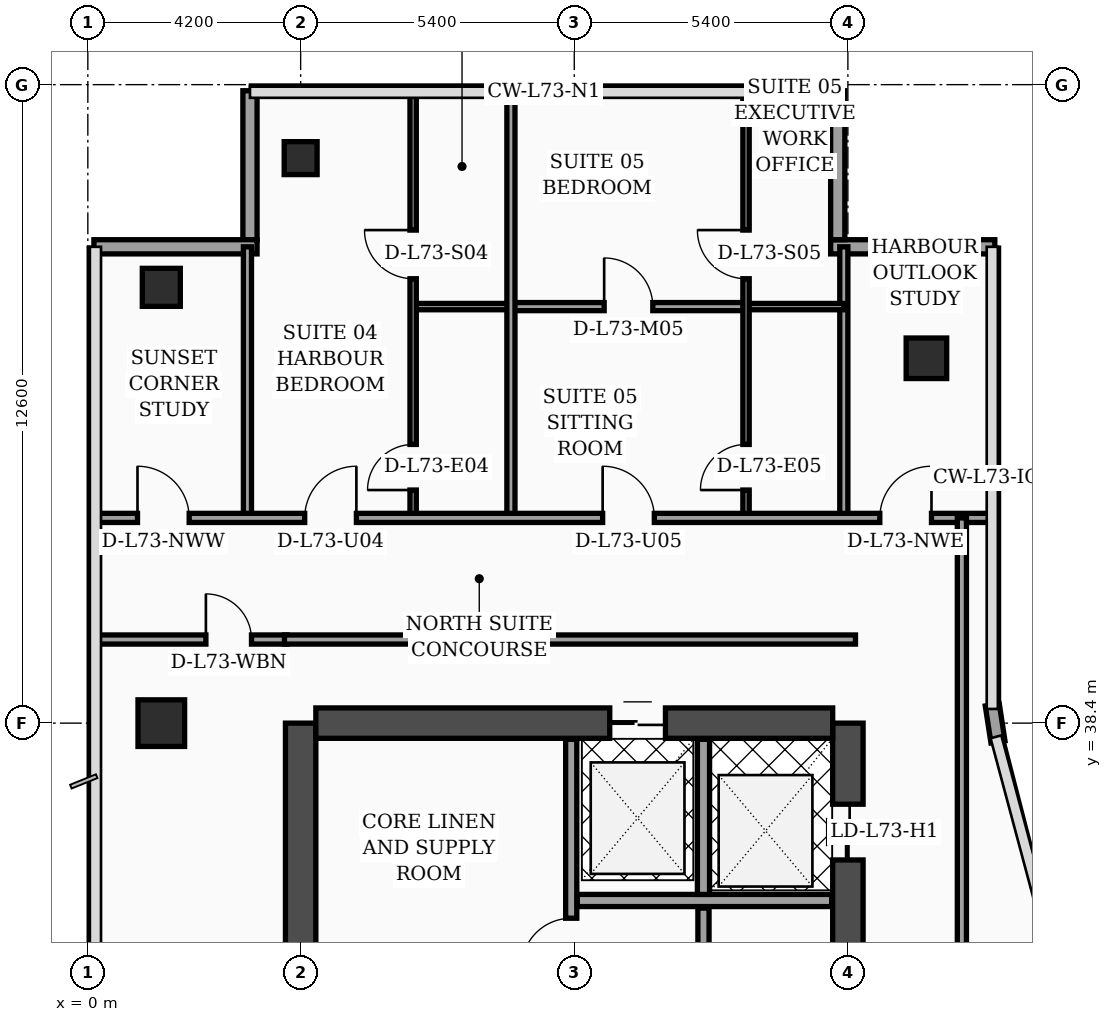
"""IFC4 building model, lengths in metres.
Left out: names, types, materials, properties, quantities, classifications, styles, units other than length and angle.
Written with IfcOpenShell. Run it as: python <this file> out.ifc"""

import sys

from ifc_helpers import new_model, si_unit, direction, frame, frame_2d, origin, origin_2d, place, context, subcontext, project, spatial, rectangle, hollow_rectangle, extrude, element, fill, save


model = new_model("IFC4")
c1 = context("Model", 3, precision=1e-05, world=origin(), true_north=direction((0.0, 1.0)))
c2 = subcontext(c1, "Body", "Model", "MODEL_VIEW")
j1 = project(units=[si_unit("LENGTHUNIT", "METRE"), si_unit("PLANEANGLEUNIT", "RADIAN")], contexts=[c1])
p1 = place(None, origin())
s1 = spatial("IfcSite", under=j1, at=p1, CompositionType="ELEMENT")
p2 = place(p1, origin())
s2 = spatial("IfcBuilding", under=s1, at=p2, CompositionType="ELEMENT")
p3 = place(p2, frame((0.0, 0.0, 294.9)))
s3 = spatial("IfcBuildingStorey", under=s2, at=p3, CompositionType="ELEMENT", Elevation=294.9)
p4 = place(p3, frame((4.2, 16.8, 0.0), z_axis=(0.0, 0.0, 1.0), x_axis=(0.0, 1.0, 0.0)))
e1 = element("IfcWall", 1, at=p4, inside=s3, PredefinedType="SHEAR", context=c2, shape_type="SweptSolid", body=[
    extrude(rectangle(XDim=21.6, YDim=0.6, at=frame_2d((10.8, 0.0))), origin(), (0.0, 0.0, 1.0), 3.56),
])
p5 = place(p3, frame((15.0, 16.8, 0.0), z_axis=(0.0, 0.0, 1.0), x_axis=(0.0, 1.0, 0.0)))
e2 = element("IfcWall", 2, at=p5, inside=s3, PredefinedType="SHEAR", context=c2, shape_type="SweptSolid", body=[
    extrude(rectangle(XDim=21.6, YDim=0.6, at=frame_2d((10.8, 0.0))), origin(), (0.0, 0.0, 1.0), 3.56),
])
p6 = place(p5, frame((8.65, 0.0, 0.0)))
e3 = element("IfcOpeningElement", 3, at=p6, cuts=e2, PredefinedType="OPENING", context=c2, shape_type="SweptSolid", body=[
    extrude(rectangle(XDim=1.1, YDim=2.2, at=frame_2d((0.55, 1.1))), frame((0.0, 0.31, 0.0), z_axis=(0.0, -1.0, 0.0), x_axis=(1.0, 0.0, 0.0)), (0.0, 0.0, 1.0), 0.62),
])
p7 = place(p5, frame((18.9, 0.0, 0.0)))
e4 = element("IfcOpeningElement", 4, at=p7, cuts=e2, PredefinedType="OPENING", context=c2, shape_type="SweptSolid", body=[
    extrude(rectangle(XDim=1.1, YDim=2.2, at=frame_2d((0.55, 1.1))), frame((0.0, 0.31, 0.0), z_axis=(0.0, -1.0, 0.0), x_axis=(1.0, 0.0, 0.0)), (0.0, 0.0, 1.0), 0.62),
])
p8 = place(p3, frame((4.5, 38.4, 0.0), z_axis=(0.0, 0.0, 1.0), x_axis=(1.0, 0.0, 0.0)))
e5 = element("IfcWall", 5, at=p8, inside=s3, PredefinedType="SHEAR", context=c2, shape_type="SweptSolid", body=[
    extrude(rectangle(XDim=10.2, YDim=0.6, at=frame_2d((5.1, 0.0))), origin(), (0.0, 0.0, 1.0), 3.56),
])
p9 = place(p8, frame((5.8, 0.0, 0.0)))
e6 = element("IfcOpeningElement", 6, at=p9, cuts=e5, PredefinedType="OPENING", context=c2, shape_type="SweptSolid", body=[
    extrude(rectangle(XDim=1.1, YDim=2.2, at=frame_2d((0.55, 1.1))), frame((0.0, 0.31, 0.0), z_axis=(0.0, -1.0, 0.0), x_axis=(1.0, 0.0, 0.0)), (0.0, 0.0, 1.0), 0.62),
])
p10 = place(p3, frame((1.45, 38.4, 0.0), z_axis=(0.0, 0.0, 1.0), x_axis=(1.0, 0.0, 0.0)))
e7 = element("IfcColumn", 7, at=p10, inside=s3, PredefinedType="COLUMN", context=c2, shape_type="SweptSolid", body=[
    extrude(rectangle(XDim=0.92, YDim=0.92, at=origin_2d()), origin(), (0.0, 0.0, 1.0), 3.56),
])
p11 = place(p3, frame((1.45, 47.0, 0.0), z_axis=(0.0, 0.0, 1.0), x_axis=(1.0, 0.0, 0.0)))
e8 = element("IfcColumn", 8, at=p11, inside=s3, PredefinedType="COLUMN", context=c2, shape_type="SweptSolid", body=[
    extrude(hollow_rectangle(XDim=0.75, YDim=0.75, WallThickness=0.032, at=origin_2d()), origin(), (0.0, 0.0, 1.0), 3.56),
])
p12 = place(p3, frame((4.2, 49.55, 0.0), z_axis=(0.0, 0.0, 1.0), x_axis=(1.0, 0.0, 0.0)))
e9 = element("IfcColumn", 9, at=p12, inside=s3, PredefinedType="COLUMN", context=c2, shape_type="SweptSolid", body=[
    extrude(hollow_rectangle(XDim=0.65, YDim=0.65, WallThickness=0.028, at=origin_2d()), origin(), (0.0, 0.0, 1.0), 3.56),
])
p13 = place(p3, frame((16.55, 45.6, 0.0), z_axis=(0.0, 0.0, 1.0), x_axis=(1.0, 0.0, 0.0)))
e10 = element("IfcColumn", 10, at=p13, inside=s3, PredefinedType="COLUMN", context=c2, shape_type="SweptSolid", body=[
    extrude(rectangle(XDim=0.8, YDim=0.8, at=origin_2d()), origin(), (0.0, 0.0, 1.0), 3.56),
])
p14 = place(p3, frame((17.962, 38.03, 0.0), z_axis=(0.0, 0.0, 1.0), x_axis=(-0.15141125477, 0.988470855377, 0.0)))
e11 = element("IfcWall", 11, at=p14, inside=s3, PredefinedType="SOLIDWALL", context=c2, shape_type="SweptSolid", body=[
    extrude(rectangle(XDim=0.739, YDim=0.28, at=frame_2d((0.369, 0.0))), origin(), (0.0, 0.0, 1.0), 3.56),
])
p15 = place(p3, frame((17.9, 47.8, 0.0), z_axis=(0.0, 0.0, 1.0), x_axis=(-1.0, 0.0, 0.0)))
e12 = element("IfcWall", 12, at=p15, inside=s3, PredefinedType="SOLIDWALL", context=c2, shape_type="SweptSolid", body=[
    extrude(rectangle(XDim=3.24, YDim=0.28, at=frame_2d((1.62, 0.0))), origin(), (0.0, 0.0, 1.0), 3.56),
])
p16 = place(p3, frame((14.8, 47.94, 0.0), z_axis=(0.0, 0.0, 1.0), x_axis=(0.0, 1.0, 0.0)))
e13 = element("IfcWall", 13, at=p16, inside=s3, PredefinedType="SOLIDWALL", context=c2, shape_type="SweptSolid", body=[
    extrude(rectangle(XDim=2.94, YDim=0.28, at=frame_2d((1.47, 0.0))), origin(), (0.0, 0.0, 1.0), 3.56),
])
p17 = place(p3, frame((3.2, 50.88, 0.0), z_axis=(0.0, 0.0, 1.0), x_axis=(0.0, -1.0, 0.0)))
e14 = element("IfcWall", 14, at=p17, inside=s3, PredefinedType="SOLIDWALL", context=c2, shape_type="SweptSolid", body=[
    extrude(rectangle(XDim=2.94, YDim=0.28, at=frame_2d((1.47, 0.0))), origin(), (0.0, 0.0, 1.0), 3.09),
])
p18 = place(p3, frame((3.34, 47.8, 0.0), z_axis=(0.0, 0.0, 1.0), x_axis=(-1.0, 0.0, 0.0)))
e15 = element("IfcWall", 15, at=p18, inside=s3, PredefinedType="SOLIDWALL", context=c2, shape_type="SweptSolid", body=[
    extrude(rectangle(XDim=3.22, YDim=0.28, at=frame_2d((1.61, 0.0))), origin(), (0.0, 0.0, 1.0), 3.09),
])
p19 = place(p3, frame((9.54, 32.92, 0.0), z_axis=(0.0, 0.0, 1.0), x_axis=(0.0, 1.0, 0.0)))
e16 = element("IfcWall", 16, at=p19, inside=s3, PredefinedType="SOLIDWALL", context=c2, shape_type="SweptSolid", body=[
    extrude(rectangle(XDim=5.16, YDim=0.22, at=frame_2d((2.58, 0.0))), origin(), (0.0, 0.0, 1.0), 3.56),
])
p20 = place(p19, frame((0.65, 0.0, 0.0)))
e17 = element("IfcOpeningElement", 17, at=p20, cuts=e16, PredefinedType="OPENING", context=c2, shape_type="SweptSolid", body=[
    extrude(rectangle(XDim=0.98, YDim=2.15, at=frame_2d((0.49, 1.075))), frame((0.0, 0.12, 0.0), z_axis=(0.0, -1.0, 0.0), x_axis=(1.0, 0.0, 0.0)), (0.0, 0.0, 1.0), 0.24),
])
p21 = place(p3, frame((12.15, 27.0, 0.0), z_axis=(0.0, 0.0, 1.0), x_axis=(0.0, 1.0, 0.0)))
e18 = element("IfcWall", 18, at=p21, inside=s3, PredefinedType="SOLIDWALL", context=c2, shape_type="SweptSolid", body=[
    extrude(rectangle(XDim=7.75, YDim=0.22, at=frame_2d((3.875, 0.0))), origin(), (0.0, 0.0, 1.0), 3.56),
])
p22 = place(p21, frame((0.8, 0.0, 0.0)))
e19 = element("IfcOpeningElement", 19, at=p22, cuts=e18, PredefinedType="OPENING", context=c2, shape_type="SweptSolid", body=[
    extrude(rectangle(XDim=0.98, YDim=2.15, at=frame_2d((0.49, 1.075))), frame((0.0, 0.12, 0.0), z_axis=(0.0, -1.0, 0.0), x_axis=(1.0, 0.0, 0.0)), (0.0, 0.0, 1.0), 0.24),
])
p23 = place(p3, frame((9.66, 34.9, 0.0), z_axis=(0.0, 0.0, 1.0), x_axis=(1.0, 0.0, 0.0)))
e20 = element("IfcWall", 20, at=p23, inside=s3, PredefinedType="SOLIDWALL", context=c2, shape_type="SweptSolid", body=[
    extrude(rectangle(XDim=5.02, YDim=0.24, at=frame_2d((2.51, 0.0))), origin(), (0.0, 0.0, 1.0), 3.56),
])
p24 = place(p3, frame((12.15, 35.02, 0.0), z_axis=(0.0, 0.0, 1.0), x_axis=(0.0, 1.0, 0.0)))
e21 = element("IfcWall", 21, at=p24, inside=s3, PredefinedType="SOLIDWALL", context=c2, shape_type="SweptSolid", body=[
    extrude(rectangle(XDim=3.06, YDim=0.24, at=frame_2d((1.53, 0.0))), origin(), (0.0, 0.0, 1.0), 3.56),
])
p25 = place(p3, frame((0.08, 40.05, 0.0), z_axis=(0.0, 0.0, 1.0), x_axis=(1.0, 0.0, 0.0)))
e22 = element("IfcWall", 22, at=p25, inside=s3, PredefinedType="PARTITIONING", context=c2, shape_type="SweptSolid", body=[
    extrude(rectangle(XDim=3.85, YDim=0.18, at=frame_2d((1.925, 0.0))), origin(), (0.0, 0.0, 1.0), 2.99),
])
p26 = place(p25, frame((2.25, 0.0, 0.0)))
e23 = element("IfcOpeningElement", 23, at=p26, cuts=e22, PredefinedType="OPENING", context=c2, shape_type="SweptSolid", body=[
    extrude(rectangle(XDim=0.9, YDim=2.15, at=frame_2d((0.45, 1.075))), frame((0.0, 0.1, 0.0), z_axis=(0.0, -1.0, 0.0), x_axis=(1.0, 0.0, 0.0)), (0.0, 0.0, 1.0), 0.2),
])
p27 = place(p3, frame((3.15, 42.45, 0.0), z_axis=(0.0, 0.0, 1.0), x_axis=(0.0, 1.0, 0.0)))
e24 = element("IfcWall", 24, at=p27, inside=s3, PredefinedType="PARTITIONING", context=c2, shape_type="SweptSolid", body=[
    extrude(rectangle(XDim=5.35, YDim=0.16, at=frame_2d((2.675, 0.0))), origin(), (0.0, 0.0, 1.0), 3.14),
])
p28 = place(p3, frame((14.92, 42.45, 0.0), z_axis=(0.0, 0.0, 1.0), x_axis=(0.0, 1.0, 0.0)))
e25 = element("IfcWall", 25, at=p28, inside=s3, PredefinedType="PARTITIONING", context=c2, shape_type="SweptSolid", body=[
    extrude(rectangle(XDim=5.35, YDim=0.16, at=frame_2d((2.675, 0.0))), origin(), (0.0, 0.0, 1.0), 3.09),
])
p29 = place(p3, frame((6.42, 46.62, 0.0), z_axis=(0.0, 0.0, 1.0), x_axis=(1.0, 0.0, 0.0)))
e26 = element("IfcWall", 26, at=p29, inside=s3, PredefinedType="PARTITIONING", context=c2, shape_type="SweptSolid", body=[
    extrude(rectangle(XDim=1.93, YDim=0.125, at=frame_2d((0.965, 0.0))), origin(), (0.0, 0.0, 1.0), 3.56),
])
p30 = place(p3, frame((6.42, 42.45, 0.0), z_axis=(0.0, 0.0, 1.0), x_axis=(0.0, 1.0, 0.0)))
e27 = element("IfcWall", 27, at=p30, inside=s3, PredefinedType="PARTITIONING", context=c2, shape_type="SweptSolid", body=[
    extrude(rectangle(XDim=8.49, YDim=0.125, at=frame_2d((4.245, 0.0))), origin(), (0.0, 0.0, 1.0), 3.09),
])
p31 = place(p30, frame((0.55, 0.0, 0.0)))
e28 = element("IfcOpeningElement", 28, at=p31, cuts=e27, PredefinedType="OPENING", context=c2, shape_type="SweptSolid", body=[
    extrude(rectangle(XDim=0.9, YDim=2.15, at=frame_2d((0.45, 1.075))), frame((0.0, 0.073, 0.0), z_axis=(0.0, -1.0, 0.0), x_axis=(1.0, 0.0, 0.0)), (0.0, 0.0, 1.0), 0.145),
])
p32 = place(p30, frame((4.72, 0.0, 0.0)))
e29 = element("IfcOpeningElement", 29, at=p32, cuts=e27, PredefinedType="OPENING", context=c2, shape_type="SweptSolid", body=[
    extrude(rectangle(XDim=0.96, YDim=2.2, at=frame_2d((0.48, 1.1))), frame((0.0, 0.073, 0.0), z_axis=(0.0, -1.0, 0.0), x_axis=(1.0, 0.0, 0.0)), (0.0, 0.0, 1.0), 0.145),
])
p33 = place(p3, frame((12.99, 46.62, 0.0), z_axis=(0.0, 0.0, 1.0), x_axis=(1.0, 0.0, 0.0)))
e30 = element("IfcWall", 30, at=p33, inside=s3, PredefinedType="PARTITIONING", context=c2, shape_type="SweptSolid", body=[
    extrude(rectangle(XDim=1.93, YDim=0.125, at=frame_2d((0.965, 0.0))), origin(), (0.0, 0.0, 1.0), 3.09),
])
p34 = place(p3, frame((8.35, 46.62, 0.0), z_axis=(0.0, 0.0, 1.0), x_axis=(1.0, 0.0, 0.0)))
e31 = element("IfcWall", 31, at=p34, inside=s3, PredefinedType="PARTITIONING", context=c2, shape_type="SweptSolid", body=[
    extrude(rectangle(XDim=4.64, YDim=0.16, at=frame_2d((2.32, 0.0))), origin(), (0.0, 0.0, 1.0), 3.09),
])
p35 = place(p34, frame((1.84, 0.0, 0.0)))
e32 = element("IfcOpeningElement", 32, at=p35, cuts=e31, PredefinedType="OPENING", context=c2, shape_type="SweptSolid", body=[
    extrude(rectangle(XDim=0.96, YDim=2.2, at=frame_2d((0.48, 1.1))), frame((0.0, 0.09, 0.0), z_axis=(0.0, -1.0, 0.0), x_axis=(1.0, 0.0, 0.0)), (0.0, 0.0, 1.0), 0.18),
])
p36 = place(p3, frame((12.99, 42.45, 0.0), z_axis=(0.0, 0.0, 1.0), x_axis=(0.0, 1.0, 0.0)))
e33 = element("IfcWall", 33, at=p36, inside=s3, PredefinedType="PARTITIONING", context=c2, shape_type="SweptSolid", body=[
    extrude(rectangle(XDim=8.49, YDim=0.125, at=frame_2d((4.245, 0.0))), origin(), (0.0, 0.0, 1.0), 3.09),
])
p37 = place(p36, frame((0.55, 0.0, 0.0)))
e34 = element("IfcOpeningElement", 34, at=p37, cuts=e33, PredefinedType="OPENING", context=c2, shape_type="SweptSolid", body=[
    extrude(rectangle(XDim=0.9, YDim=2.15, at=frame_2d((0.45, 1.075))), frame((0.0, 0.073, 0.0), z_axis=(0.0, -1.0, 0.0), x_axis=(1.0, 0.0, 0.0)), (0.0, 0.0, 1.0), 0.145),
])
p38 = place(p36, frame((4.72, 0.0, 0.0)))
e35 = element("IfcOpeningElement", 35, at=p38, cuts=e33, PredefinedType="OPENING", context=c2, shape_type="SweptSolid", body=[
    extrude(rectangle(XDim=0.96, YDim=2.2, at=frame_2d((0.48, 1.1))), frame((0.0, 0.073, 0.0), z_axis=(0.0, -1.0, 0.0), x_axis=(1.0, 0.0, 0.0)), (0.0, 0.0, 1.0), 0.145),
])
p39 = place(p3, frame((8.35, 42.45, 0.0), z_axis=(0.0, 0.0, 1.0), x_axis=(0.0, 1.0, 0.0)))
e36 = element("IfcWall", 36, at=p39, inside=s3, PredefinedType="PARTITIONING", context=c2, shape_type="SweptSolid", body=[
    extrude(rectangle(XDim=8.49, YDim=0.16, at=frame_2d((4.245, 0.0))), origin(), (0.0, 0.0, 1.0), 3.09),
])
p40 = place(p3, frame((0.08, 42.45, 0.0), z_axis=(0.0, 0.0, 1.0), x_axis=(1.0, 0.0, 0.0)))
e37 = element("IfcWall", 37, at=p40, inside=s3, PredefinedType="PARTITIONING", context=c2, shape_type="SweptSolid", body=[
    extrude(rectangle(XDim=17.77, YDim=0.18, at=frame_2d((8.885, 0.0))), origin(), (0.0, 0.0, 1.0), 2.99),
])
p41 = place(p40, frame((0.9, 0.0, 0.0)))
e38 = element("IfcOpeningElement", 38, at=p41, cuts=e37, PredefinedType="OPENING", context=c2, shape_type="SweptSolid", body=[
    extrude(rectangle(XDim=1.02, YDim=2.2, at=frame_2d((0.51, 1.1))), frame((0.0, 0.1, 0.0), z_axis=(0.0, -1.0, 0.0), x_axis=(1.0, 0.0, 0.0)), (0.0, 0.0, 1.0), 0.2),
])
p42 = place(p40, frame((4.2, 0.0, 0.0)))
e39 = element("IfcOpeningElement", 39, at=p42, cuts=e37, PredefinedType="OPENING", context=c2, shape_type="SweptSolid", body=[
    extrude(rectangle(XDim=1.02, YDim=2.2, at=frame_2d((0.51, 1.1))), frame((0.0, 0.1, 0.0), z_axis=(0.0, -1.0, 0.0), x_axis=(1.0, 0.0, 0.0)), (0.0, 0.0, 1.0), 0.2),
])
p43 = place(p40, frame((10.08, 0.0, 0.0)))
e40 = element("IfcOpeningElement", 40, at=p43, cuts=e37, PredefinedType="OPENING", context=c2, shape_type="SweptSolid", body=[
    extrude(rectangle(XDim=1.02, YDim=2.2, at=frame_2d((0.51, 1.1))), frame((0.0, 0.1, 0.0), z_axis=(0.0, -1.0, 0.0), x_axis=(1.0, 0.0, 0.0)), (0.0, 0.0, 1.0), 0.2),
])
p44 = place(p40, frame((15.55, 0.0, 0.0)))
e41 = element("IfcOpeningElement", 41, at=p44, cuts=e37, PredefinedType="OPENING", context=c2, shape_type="SweptSolid", body=[
    extrude(rectangle(XDim=1.02, YDim=2.2, at=frame_2d((0.51, 1.1))), frame((0.0, 0.1, 0.0), z_axis=(0.0, -1.0, 0.0), x_axis=(1.0, 0.0, 0.0)), (0.0, 0.0, 1.0), 0.2),
])
p45 = place(p3, frame((17.25, 24.3, 0.0), z_axis=(0.0, 0.0, 1.0), x_axis=(0.0, 1.0, 0.0)))
e42 = element("IfcWall", 42, at=p45, inside=s3, PredefinedType="PARTITIONING", context=c2, shape_type="SweptSolid", body=[
    extrude(rectangle(XDim=18.15, YDim=0.18, at=frame_2d((9.075, 0.0))), origin(), (0.0, 0.0, 1.0), 2.99),
])
p46 = place(p45, frame((3.2, 0.0, 0.0)))
e43 = element("IfcOpeningElement", 43, at=p46, cuts=e42, PredefinedType="OPENING", context=c2, shape_type="SweptSolid", body=[
    extrude(rectangle(XDim=1.02, YDim=2.2, at=frame_2d((0.51, 1.1))), frame((0.0, 0.1, 0.0), z_axis=(0.0, -1.0, 0.0), x_axis=(1.0, 0.0, 0.0)), (0.0, 0.0, 1.0), 0.2),
])
p47 = place(p3, frame((3.88, 40.05, 0.0), z_axis=(0.0, 0.0, 1.0), x_axis=(1.0, 0.0, 0.0)))
e44 = element("IfcWall", 44, at=p47, inside=s3, PredefinedType="PARTITIONING", context=c2, shape_type="SweptSolid", body=[
    extrude(rectangle(XDim=11.27, YDim=0.18, at=frame_2d((5.635, 0.0))), origin(), (0.0, 0.0, 1.0), 2.99),
])
p48 = place(p20, origin())
e45 = element("IfcDoor", 45, at=p48, inside=s3, OperationType="SINGLE_SWING_LEFT", PredefinedType="DOOR", context=c2, shape_type="SweptSolid", body=[
    extrude(rectangle(XDim=0.98, YDim=2.15, at=frame_2d((0.49, 1.075))), frame((0.0, 0.025, 0.0), z_axis=(0.0, -1.0, 0.0), x_axis=(1.0, 0.0, 0.0)), (0.0, 0.0, 1.0), 0.05),
])
fill(e17, e45)
p49 = place(p26, origin())
e46 = element("IfcDoor", 46, at=p49, inside=s3, OperationType="SINGLE_SWING_LEFT", PredefinedType="DOOR", context=c2, shape_type="SweptSolid", body=[
    extrude(rectangle(XDim=0.9, YDim=2.15, at=frame_2d((0.45, 1.075))), frame((0.0, 0.025, 0.0), z_axis=(0.0, -1.0, 0.0), x_axis=(1.0, 0.0, 0.0)), (0.0, 0.0, 1.0), 0.05),
])
fill(e23, e46)
p50 = place(p31, origin())
e47 = element("IfcDoor", 47, at=p50, inside=s3, OperationType="SINGLE_SWING_LEFT", PredefinedType="DOOR", context=c2, shape_type="SweptSolid", body=[
    extrude(rectangle(XDim=0.9, YDim=2.15, at=frame_2d((0.45, 1.075))), frame((0.0, 0.025, 0.0), z_axis=(0.0, -1.0, 0.0), x_axis=(1.0, 0.0, 0.0)), (0.0, 0.0, 1.0), 0.05),
])
fill(e28, e47)
p51 = place(p32, origin())
e48 = element("IfcDoor", 48, at=p51, inside=s3, OperationType="SINGLE_SWING_RIGHT", PredefinedType="DOOR", context=c2, shape_type="SweptSolid", body=[
    extrude(rectangle(XDim=0.96, YDim=2.2, at=frame_2d((0.48, 1.1))), frame((0.0, 0.025, 0.0), z_axis=(0.0, -1.0, 0.0), x_axis=(1.0, 0.0, 0.0)), (0.0, 0.0, 1.0), 0.05),
])
fill(e29, e48)
p52 = place(p35, origin())
e49 = element("IfcDoor", 49, at=p52, inside=s3, OperationType="SINGLE_SWING_LEFT", PredefinedType="DOOR", context=c2, shape_type="SweptSolid", body=[
    extrude(rectangle(XDim=0.96, YDim=2.2, at=frame_2d((0.48, 1.1))), frame((0.0, 0.025, 0.0), z_axis=(0.0, -1.0, 0.0), x_axis=(1.0, 0.0, 0.0)), (0.0, 0.0, 1.0), 0.05),
])
fill(e32, e49)
p53 = place(p37, origin())
e50 = element("IfcDoor", 50, at=p53, inside=s3, OperationType="SINGLE_SWING_LEFT", PredefinedType="DOOR", context=c2, shape_type="SweptSolid", body=[
    extrude(rectangle(XDim=0.9, YDim=2.15, at=frame_2d((0.45, 1.075))), frame((0.0, 0.025, 0.0), z_axis=(0.0, -1.0, 0.0), x_axis=(1.0, 0.0, 0.0)), (0.0, 0.0, 1.0), 0.05),
])
fill(e34, e50)
p54 = place(p38, origin())
e51 = element("IfcDoor", 51, at=p54, inside=s3, OperationType="SINGLE_SWING_RIGHT", PredefinedType="DOOR", context=c2, shape_type="SweptSolid", body=[
    extrude(rectangle(XDim=0.96, YDim=2.2, at=frame_2d((0.48, 1.1))), frame((0.0, 0.025, 0.0), z_axis=(0.0, -1.0, 0.0), x_axis=(1.0, 0.0, 0.0)), (0.0, 0.0, 1.0), 0.05),
])
fill(e35, e51)
p55 = place(p41, origin())
e52 = element("IfcDoor", 52, at=p55, inside=s3, OperationType="SINGLE_SWING_LEFT", PredefinedType="DOOR", context=c2, shape_type="SweptSolid", body=[
    extrude(rectangle(XDim=1.02, YDim=2.2, at=frame_2d((0.51, 1.1))), frame((0.0, 0.025, 0.0), z_axis=(0.0, -1.0, 0.0), x_axis=(1.0, 0.0, 0.0)), (0.0, 0.0, 1.0), 0.05),
])
fill(e38, e52)
p56 = place(p42, origin())
e53 = element("IfcDoor", 53, at=p56, inside=s3, OperationType="SINGLE_SWING_RIGHT", PredefinedType="DOOR", context=c2, shape_type="SweptSolid", body=[
    extrude(rectangle(XDim=1.02, YDim=2.2, at=frame_2d((0.51, 1.1))), frame((0.0, 0.025, 0.0), z_axis=(0.0, -1.0, 0.0), x_axis=(1.0, 0.0, 0.0)), (0.0, 0.0, 1.0), 0.05),
])
fill(e39, e53)
p57 = place(p43, origin())
e54 = element("IfcDoor", 54, at=p57, inside=s3, OperationType="SINGLE_SWING_LEFT", PredefinedType="DOOR", context=c2, shape_type="SweptSolid", body=[
    extrude(rectangle(XDim=1.02, YDim=2.2, at=frame_2d((0.51, 1.1))), frame((0.0, 0.025, 0.0), z_axis=(0.0, -1.0, 0.0), x_axis=(1.0, 0.0, 0.0)), (0.0, 0.0, 1.0), 0.05),
])
fill(e40, e54)
p58 = place(p44, origin())
e55 = element("IfcDoor", 55, at=p58, inside=s3, OperationType="SINGLE_SWING_RIGHT", PredefinedType="DOOR", context=c2, shape_type="SweptSolid", body=[
    extrude(rectangle(XDim=1.02, YDim=2.2, at=frame_2d((0.51, 1.1))), frame((0.0, 0.025, 0.0), z_axis=(0.0, -1.0, 0.0), x_axis=(1.0, 0.0, 0.0)), (0.0, 0.0, 1.0), 0.05),
])
fill(e41, e55)
p59 = place(p7, origin())
e56 = element("IfcDoor", 56, at=p59, inside=s3, OperationType="DOUBLE_DOOR_SLIDING", PredefinedType="DOOR", context=c2, shape_type="SweptSolid", body=[
    extrude(rectangle(XDim=1.1, YDim=2.2, at=frame_2d((0.55, 1.1))), frame((0.0, 0.025, 0.0), z_axis=(0.0, -1.0, 0.0), x_axis=(1.0, 0.0, 0.0)), (0.0, 0.0, 1.0), 0.05),
])
fill(e4, e56)
p60 = place(p9, origin())
e57 = element("IfcDoor", 57, at=p60, inside=s3, OperationType="DOUBLE_DOOR_SLIDING", PredefinedType="DOOR", context=c2, shape_type="SweptSolid", body=[
    extrude(rectangle(XDim=1.1, YDim=2.2, at=frame_2d((0.55, 1.1))), frame((0.0, 0.025, 0.0), z_axis=(0.0, -1.0, 0.0), x_axis=(1.0, 0.0, 0.0)), (0.0, 0.0, 1.0), 0.05),
])
fill(e6, e57)
save(model, sys.argv[1])
